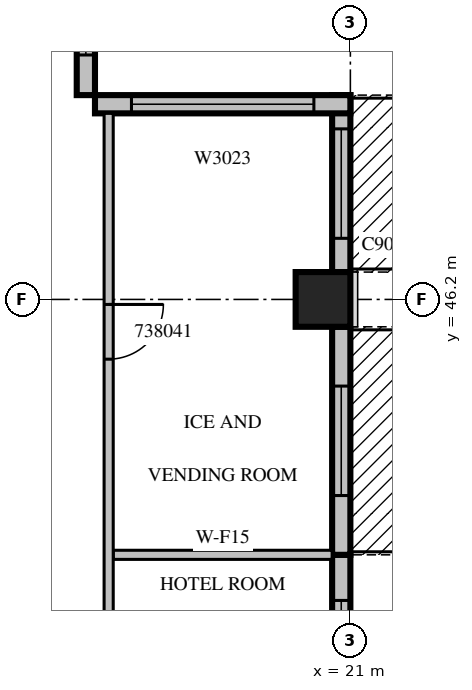
"""IFC4 building model, lengths in metres.
Left out: names, types, materials, properties, quantities, classifications, styles, units other than length and angle.
Written with IfcOpenShell. Run it as: python <this file> out.ifc"""

import sys

from ifc_helpers import new_model, si_unit, direction, frame, frame_2d, origin, origin_2d, place, context, subcontext, project, spatial, rectangle, extrude, source, transform, mapped, element, fill, save


model = new_model("IFC4")
c1 = context("Model", 3, precision=1e-05, world=origin(), true_north=direction((0.0, 1.0)))
c2 = subcontext(c1, "Body", "Model", "MODEL_VIEW")
j1 = project(units=[si_unit("LENGTHUNIT", "METRE"), si_unit("PLANEANGLEUNIT", "RADIAN")], contexts=[c1])
p1 = place(None, origin())
s1 = spatial("IfcSite", under=j1, at=p1, CompositionType="ELEMENT")
p2 = place(p1, origin())
s2 = spatial("IfcBuilding", under=s1, at=p2, CompositionType="ELEMENT")
p3 = place(p2, frame((0.0, 0.0, 177.8)))
s3 = spatial("IfcBuildingStorey", under=s2, at=p3, CompositionType="ELEMENT", Elevation=177.8)
m1 = source(origin(), c2, "Body", "SweptSolid", [
    extrude(rectangle(XDim=0.9, YDim=0.9, at=origin_2d()), origin(), (0.0, 0.0, 1.0), 3.8),
])
p4 = place(p3, frame((20.55, 46.2, 0.0), z_axis=(0.0, 0.0, 1.0), x_axis=(1.0, 0.0, 0.0)))
e1 = element("IfcColumn", 1, at=p4, inside=s3, PredefinedType="COLUMN", context=c2, shape_type="MappedRepresentation", body=[
    mapped(m1, transform((0.0, 0.0, 0.0), scale=1.0)),
])
p5 = place(p3, frame((20.85, 38.25, 0.0), z_axis=(0.0, 0.0, 1.0), x_axis=(0.0, 1.0, 0.0)))
e2 = element("IfcWall", 2, at=p5, inside=s3, PredefinedType="STANDARD", context=c2, shape_type="SweptSolid", body=[
    extrude(rectangle(XDim=3.75, YDim=0.3, at=frame_2d((1.875, 0.0))), origin(), (0.0, 0.0, 1.0), 3.4),
])
m2 = source(origin(), c2, "Body", "SweptSolid", [
    extrude(rectangle(XDim=1.8, YDim=2.3, at=frame_2d((0.9, 1.15))), frame((0.0, 0.16, 0.0), z_axis=(0.0, -1.0, 0.0), x_axis=(1.0, 0.0, 0.0)), (0.0, 0.0, 1.0), 0.32),
])
p6 = place(p5, frame((1.2, 0.0, 0.6)))
e3 = element("IfcOpeningElement", 3, at=p6, cuts=e2, PredefinedType="OPENING", context=c2, shape_type="MappedRepresentation", body=[
    mapped(m2, transform((0.0, 0.0, 0.0), scale=1.0)),
])
m3 = source(origin(), c2, "Body", "SweptSolid", [
    extrude(rectangle(XDim=3.75, YDim=0.3, at=frame_2d((1.875, 0.0))), origin(), (0.0, 0.0, 1.0), 3.4),
])
p7 = place(p3, frame((20.85, 42.0, 0.0), z_axis=(0.0, 0.0, 1.0), x_axis=(0.0, 1.0, 0.0)))
e4 = element("IfcWall", 4, at=p7, inside=s3, PredefinedType="STANDARD", context=c2, shape_type="MappedRepresentation", body=[
    mapped(m3, transform((0.0, 0.0, 0.0), scale=1.0)),
])
m4 = source(origin(), c2, "Body", "SweptSolid", [
    extrude(rectangle(XDim=1.8, YDim=2.4, at=frame_2d((0.9, 1.2))), frame((0.0, 0.16, 0.0), z_axis=(0.0, -1.0, 0.0), x_axis=(1.0, 0.0, 0.0)), (0.0, 0.0, 1.0), 0.32),
])
p8 = place(p7, frame((0.975, 0.0, 0.0)))
e5 = element("IfcOpeningElement", 5, at=p8, cuts=e4, PredefinedType="OPENING", context=c2, shape_type="MappedRepresentation", body=[
    mapped(m4, transform((0.0, 0.0, 0.0), scale=1.0)),
])
m5 = source(origin(), c2, "Body", "SweptSolid", [
    extrude(rectangle(XDim=2.91, YDim=0.3, at=frame_2d((1.455, 0.0))), origin(), (0.0, 0.0, 1.0), 3.4),
])
p9 = place(p3, frame((20.85, 46.65, 0.0), z_axis=(0.0, 0.0, 1.0), x_axis=(0.0, 1.0, 0.0)))
e6 = element("IfcWall", 6, at=p9, inside=s3, PredefinedType="STANDARD", context=c2, shape_type="MappedRepresentation", body=[
    mapped(m5, transform((0.0, 0.0, 0.0), scale=1.0)),
])
p10 = place(p9, frame((0.555, 0.0, 0.0)))
e7 = element("IfcOpeningElement", 7, at=p10, cuts=e6, PredefinedType="OPENING", context=c2, shape_type="MappedRepresentation", body=[
    mapped(m4, transform((0.0, 0.0, 0.0), scale=1.0)),
])
m6 = source(origin(), c2, "Body", "SweptSolid", [
    extrude(rectangle(XDim=4.2, YDim=0.3, at=frame_2d((2.1, 0.0))), origin(), (0.0, 0.0, 1.0), 3.4),
])
p11 = place(p3, frame((21.0, 49.41, 0.0), z_axis=(0.0, 0.0, 1.0), x_axis=(-1.0, 0.0, 0.0)))
e8 = element("IfcWall", 8, at=p11, inside=s3, PredefinedType="STANDARD", context=c2, shape_type="MappedRepresentation", body=[
    mapped(m6, transform((0.0, 0.0, 0.0), scale=1.0)),
])
m7 = source(origin(), c2, "Body", "SweptSolid", [
    extrude(rectangle(XDim=3.0, YDim=2.3, at=frame_2d((1.5, 1.15))), frame((0.0, 0.16, 0.0), z_axis=(0.0, -1.0, 0.0), x_axis=(1.0, 0.0, 0.0)), (0.0, 0.0, 1.0), 0.32),
])
p12 = place(p11, frame((0.6, 0.0, 0.6)))
e9 = element("IfcOpeningElement", 9, at=p12, cuts=e8, PredefinedType="OPENING", context=c2, shape_type="MappedRepresentation", body=[
    mapped(m7, transform((0.0, 0.0, 0.0), scale=1.0)),
])
m8 = source(origin(), c2, "Body", "SweptSolid", [
    extrude(rectangle(XDim=2.52, YDim=0.3, at=frame_2d((1.26, 0.0))), origin(), (0.0, 0.0, 1.0), 3.4),
])
p13 = place(p3, frame((16.65, 49.56, 0.0), z_axis=(0.0, 0.0, 1.0), x_axis=(0.0, 1.0, 0.0)))
e10 = element("IfcWall", 10, at=p13, inside=s3, PredefinedType="STANDARD", context=c2, shape_type="MappedRepresentation", body=[
    mapped(m8, transform((0.0, 0.0, 0.0), scale=1.0)),
])
m9 = source(origin(), c2, "Body", "SweptSolid", [
    extrude(rectangle(XDim=1.2, YDim=2.3, at=frame_2d((0.6, 1.15))), frame((0.0, 0.16, 0.0), z_axis=(0.0, -1.0, 0.0), x_axis=(1.0, 0.0, 0.0)), (0.0, 0.0, 1.0), 0.32),
])
p14 = place(p13, frame((0.66, 0.0, 0.6)))
e11 = element("IfcOpeningElement", 11, at=p14, cuts=e10, PredefinedType="OPENING", context=c2, shape_type="MappedRepresentation", body=[
    mapped(m9, transform((0.0, 0.0, 0.0), scale=1.0)),
])
m10 = source(origin(), c2, "Body", "SweptSolid", [
    extrude(rectangle(XDim=3.6, YDim=0.15, at=frame_2d((1.8, 0.0))), origin(), (0.0, 0.0, 1.0), 3.4),
])
p15 = place(p3, frame((20.7, 42.0, 0.0), z_axis=(0.0, 0.0, 1.0), x_axis=(-1.0, 0.0, 0.0)))
e12 = element("IfcWall", 12, at=p15, inside=s3, PredefinedType="PARTITIONING", context=c2, shape_type="MappedRepresentation", body=[
    mapped(m10, transform((0.0, 0.0, 0.0), scale=1.0)),
])
p16 = place(p3, frame((17.025, 49.26, 0.0), z_axis=(0.0, 0.0, 1.0), x_axis=(0.0, -1.0, 0.0)))
e13 = element("IfcWall", 13, at=p16, inside=s3, PredefinedType="PARTITIONING", context=c2, shape_type="SweptSolid", body=[
    extrude(rectangle(XDim=19.86, YDim=0.15, at=frame_2d((9.93, 0.0))), origin(), (0.0, 0.0, 1.0), 3.4),
])
m11 = source(origin(), c2, "Body", "SweptSolid", [
    extrude(rectangle(XDim=0.9, YDim=2.1, at=frame_2d((0.45, 1.05))), frame((0.0, 0.085, 0.0), z_axis=(0.0, -1.0, 0.0), x_axis=(1.0, 0.0, 0.0)), (0.0, 0.0, 1.0), 0.17),
])
p17 = place(p16, frame((18.076, 0.0, 0.0)))
e14 = element("IfcOpeningElement", 14, at=p17, cuts=e13, PredefinedType="OPENING", context=c2, shape_type="MappedRepresentation", body=[
    mapped(m11, transform((0.0, 0.0, 0.0), scale=1.0)),
])
p18 = place(p16, frame((15.976, 0.0, 0.0)))
e15 = element("IfcOpeningElement", 15, at=p18, cuts=e13, PredefinedType="OPENING", context=c2, shape_type="MappedRepresentation", body=[
    mapped(m11, transform((0.0, 0.0, 0.0), scale=1.0)),
])
m12 = source(origin(), c2, "Body", "SweptSolid", [
    extrude(rectangle(XDim=1.0, YDim=2.1, at=frame_2d((0.5, 1.05))), frame((0.0, 0.085, 0.0), z_axis=(0.0, -1.0, 0.0), x_axis=(1.0, 0.0, 0.0)), (0.0, 0.0, 1.0), 0.17),
])
p19 = place(p16, frame((12.398, 0.0, 0.0)))
e16 = element("IfcOpeningElement", 16, at=p19, cuts=e13, PredefinedType="OPENING", context=c2, shape_type="MappedRepresentation", body=[
    mapped(m12, transform((0.0, 0.0, 0.0), scale=1.0)),
])
p20 = place(p16, frame((3.143, 0.0, 0.0)))
e17 = element("IfcOpeningElement", 17, at=p20, cuts=e13, PredefinedType="OPENING", context=c2, shape_type="MappedRepresentation", body=[
    mapped(m11, transform((0.0, 0.0, 0.0), scale=1.0)),
])
m13 = source(origin(), c2, "Body", "SweptSolid", [
    extrude(rectangle(XDim=1.8, YDim=2.3, at=frame_2d((0.9, 1.15))), frame((0.0, 0.03, 0.0), z_axis=(0.0, -1.0, 0.0), x_axis=(1.0, 0.0, 0.0)), (0.0, 0.0, 1.0), 0.06),
])
p21 = place(p6, origin())
e18 = element("IfcWindow", 18, at=p21, inside=s3, PartitioningType="SINGLE_PANEL", PredefinedType="WINDOW", context=c2, shape_type="MappedRepresentation", body=[
    mapped(m13, transform((0.0, 0.0, 0.0), scale=1.0)),
])
fill(e3, e18)
m14 = source(origin(), c2, "Body", "SweptSolid", [
    extrude(rectangle(XDim=1.8, YDim=2.4, at=frame_2d((0.9, 1.2))), frame((0.0, 0.025, 0.0), z_axis=(0.0, -1.0, 0.0), x_axis=(1.0, 0.0, 0.0)), (0.0, 0.0, 1.0), 0.05),
])
p22 = place(p8, origin())
e19 = element("IfcDoor", 19, at=p22, inside=s3, OperationType="SLIDING_TO_LEFT", PredefinedType="DOOR", context=c2, shape_type="MappedRepresentation", body=[
    mapped(m14, transform((0.0, 0.0, 0.0), scale=1.0)),
])
fill(e5, e19)
p23 = place(p10, origin())
e20 = element("IfcDoor", 20, at=p23, inside=s3, OperationType="SLIDING_TO_LEFT", PredefinedType="DOOR", context=c2, shape_type="MappedRepresentation", body=[
    mapped(m14, transform((0.0, 0.0, 0.0), scale=1.0)),
])
fill(e7, e20)
m15 = source(origin(), c2, "Body", "SweptSolid", [
    extrude(rectangle(XDim=3.0, YDim=2.3, at=frame_2d((1.5, 1.15))), frame((0.0, 0.03, 0.0), z_axis=(0.0, -1.0, 0.0), x_axis=(1.0, 0.0, 0.0)), (0.0, 0.0, 1.0), 0.06),
])
p24 = place(p12, origin())
e21 = element("IfcWindow", 21, at=p24, inside=s3, PartitioningType="SINGLE_PANEL", PredefinedType="WINDOW", context=c2, shape_type="MappedRepresentation", body=[
    mapped(m15, transform((0.0, 0.0, 0.0), scale=1.0)),
])
fill(e9, e21)
m16 = source(origin(), c2, "Body", "SweptSolid", [
    extrude(rectangle(XDim=1.2, YDim=2.3, at=frame_2d((0.6, 1.15))), frame((0.0, 0.03, 0.0), z_axis=(0.0, -1.0, 0.0), x_axis=(1.0, 0.0, 0.0)), (0.0, 0.0, 1.0), 0.06),
])
p25 = place(p14, origin())
e22 = element("IfcWindow", 22, at=p25, inside=s3, PartitioningType="SINGLE_PANEL", PredefinedType="WINDOW", context=c2, shape_type="MappedRepresentation", body=[
    mapped(m16, transform((0.0, 0.0, 0.0), scale=1.0)),
])
fill(e11, e22)
m17 = source(origin(), c2, "Body", "SweptSolid", [
    extrude(rectangle(XDim=0.9, YDim=2.1, at=frame_2d((0.45, 1.05))), frame((0.0, 0.025, 0.0), z_axis=(0.0, -1.0, 0.0), x_axis=(1.0, 0.0, 0.0)), (0.0, 0.0, 1.0), 0.05),
])
p26 = place(p20, origin())
e23 = element("IfcDoor", 23, at=p26, inside=s3, OperationType="SINGLE_SWING_LEFT", PredefinedType="DOOR", context=c2, shape_type="MappedRepresentation", body=[
    mapped(m17, transform((0.0, 0.0, 0.0), scale=1.0)),
])
fill(e17, e23)
save(model, sys.argv[1])
